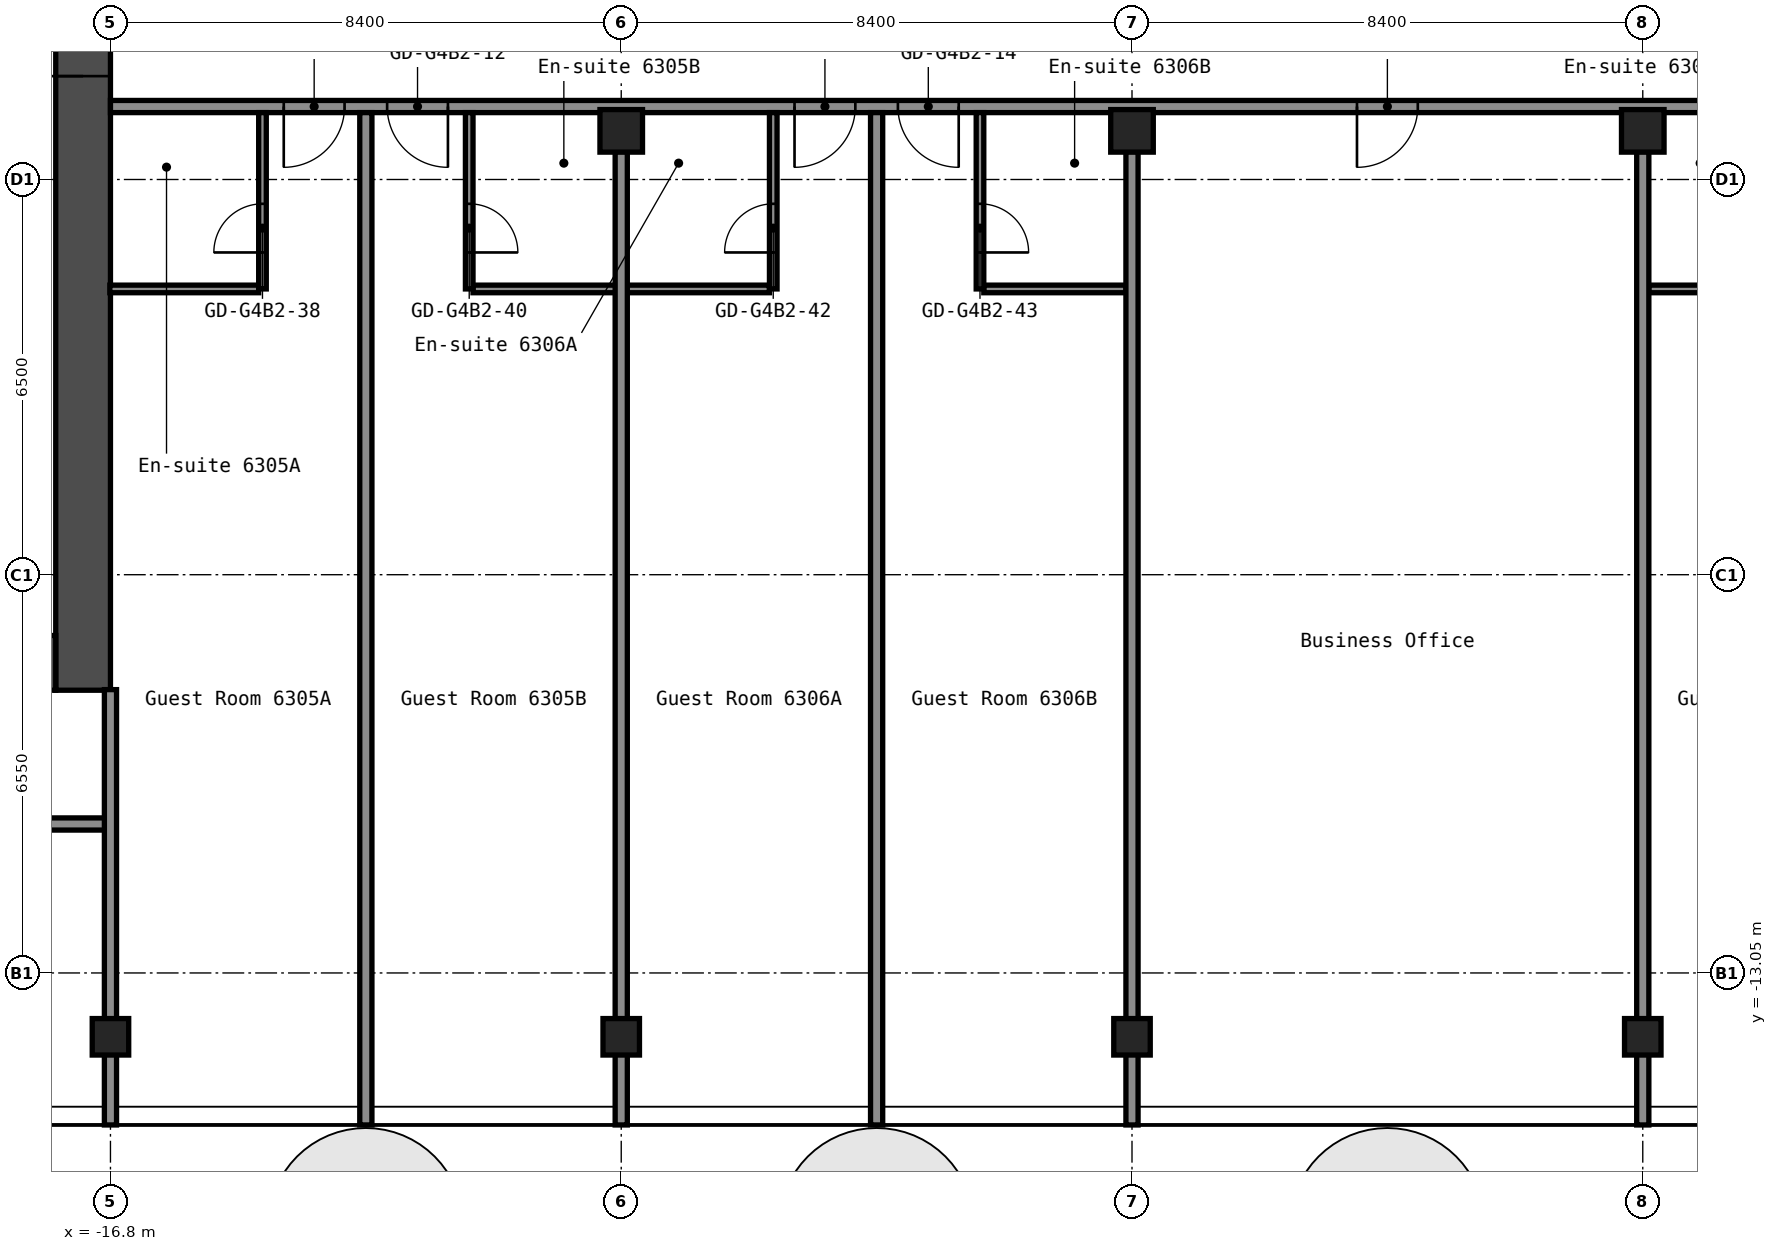
"""IFC4 building model, lengths in metres.
Left out: names, types, materials, properties, quantities, classifications, styles, units other than length and angle.
Written with IfcOpenShell. Run it as: python <this file> out.ifc"""

import sys

from ifc_helpers import new_model, si_unit, direction, frame, frame_2d, origin, origin_2d, place, context, subcontext, project, spatial, rectangle, hollow_rectangle, extrude, element, fill, save


model = new_model("IFC4")
c1 = context("Model", 3, precision=1e-05, world=origin(), true_north=direction((0.0, 1.0)))
c2 = subcontext(c1, "Body", "Model", "MODEL_VIEW")
j1 = project(units=[si_unit("LENGTHUNIT", "METRE"), si_unit("PLANEANGLEUNIT", "RADIAN")], contexts=[c1])
p1 = place(None, origin())
s1 = spatial("IfcSite", under=j1, at=p1, CompositionType="ELEMENT")
p2 = place(p1, origin())
s2 = spatial("IfcBuilding", under=s1, at=p2, CompositionType="ELEMENT")
p3 = place(p2, frame((0.0, 0.0, 221.8)))
s3 = spatial("IfcBuildingStorey", under=s2, at=p3, CompositionType="ELEMENT", Elevation=221.8)
for number, where, z_axis, x_axis in (
    (1, (-16.8, -14.1, 0.0), (0.0, 0.0, 1.0), (1.0, 0.0, 0.0)),
    (2, (-8.4, -14.1, 0.0), (0.0, 0.0, 1.0), (1.0, 0.0, 0.0)),
):
    element("IfcColumn", number, at=place(p3, frame(where, z_axis=z_axis, x_axis=x_axis)), inside=s3, PredefinedType="COLUMN", context=c2, shape_type="SweptSolid", body=[
        extrude(hollow_rectangle(XDim=0.6, YDim=0.6, WallThickness=0.025, InnerFilletRadius=0.038, OuterFilletRadius=0.062, at=origin_2d()), origin(), (0.0, 0.0, 1.0), 2.75),
    ])
p4 = place(p3, frame((-8.4, 0.8, 0.0), z_axis=(0.0, 0.0, 1.0), x_axis=(1.0, 0.0, 0.0)))
e3 = element("IfcColumn", 3, at=p4, inside=s3, PredefinedType="COLUMN", context=c2, shape_type="SweptSolid", body=[
    extrude(hollow_rectangle(XDim=0.7, YDim=0.7, WallThickness=0.028, at=origin_2d()), origin(), (0.0, 0.0, 1.0), 2.75),
])
p5 = place(p3, frame((0.0, -14.1, 0.0), z_axis=(0.0, 0.0, 1.0), x_axis=(1.0, 0.0, 0.0)))
e4 = element("IfcColumn", 4, at=p5, inside=s3, PredefinedType="COLUMN", context=c2, shape_type="SweptSolid", body=[
    extrude(hollow_rectangle(XDim=0.6, YDim=0.6, WallThickness=0.025, InnerFilletRadius=0.038, OuterFilletRadius=0.062, at=origin_2d()), origin(), (0.0, 0.0, 1.0), 2.75),
])
p6 = place(p3, frame((0.0, 0.8, 0.0), z_axis=(0.0, 0.0, 1.0), x_axis=(1.0, 0.0, 0.0)))
e5 = element("IfcColumn", 5, at=p6, inside=s3, PredefinedType="COLUMN", context=c2, shape_type="SweptSolid", body=[
    extrude(hollow_rectangle(XDim=0.7, YDim=0.7, WallThickness=0.028, at=origin_2d()), origin(), (0.0, 0.0, 1.0), 2.75),
])
p7 = place(p3, frame((8.4, -14.1, 0.0), z_axis=(0.0, 0.0, 1.0), x_axis=(1.0, 0.0, 0.0)))
e6 = element("IfcColumn", 6, at=p7, inside=s3, PredefinedType="COLUMN", context=c2, shape_type="SweptSolid", body=[
    extrude(hollow_rectangle(XDim=0.6, YDim=0.6, WallThickness=0.025, InnerFilletRadius=0.038, OuterFilletRadius=0.062, at=origin_2d()), origin(), (0.0, 0.0, 1.0), 2.75),
])
p8 = place(p3, frame((8.4, 0.8, 0.0), z_axis=(0.0, 0.0, 1.0), x_axis=(1.0, 0.0, 0.0)))
e7 = element("IfcColumn", 7, at=p8, inside=s3, PredefinedType="COLUMN", context=c2, shape_type="SweptSolid", body=[
    extrude(hollow_rectangle(XDim=0.7, YDim=0.7, WallThickness=0.028, at=origin_2d()), origin(), (0.0, 0.0, 1.0), 2.75),
])
p9 = place(p3, frame((-17.25, -8.4, 0.0), z_axis=(0.0, 0.0, 1.0), x_axis=(0.0, 1.0, 0.0)))
e8 = element("IfcWall", 8, at=p9, inside=s3, PredefinedType="SHEAR", context=c2, shape_type="SweptSolid", body=[
    extrude(rectangle(XDim=16.8, YDim=0.9, at=frame_2d((8.4, 0.0))), origin(), (0.0, 0.0, 1.0), 2.75),
])
p10 = place(p9, frame((10.1, 0.0, 0.0)))
e9 = element("IfcOpeningElement", 9, at=p10, cuts=e8, PredefinedType="OPENING", context=c2, shape_type="SweptSolid", body=[
    extrude(rectangle(XDim=1.6, YDim=2.1, at=frame_2d((0.8, 1.05))), frame((0.0, 0.46, 0.0), z_axis=(0.0, -1.0, 0.0), x_axis=(1.0, 0.0, 0.0)), (0.0, 0.0, 1.0), 0.92),
])
p11 = place(p3, frame((-32.7, -7.95, 0.0), z_axis=(0.0, 0.0, 1.0), x_axis=(1.0, 0.0, 0.0)))
e10 = element("IfcWall", 10, at=p11, inside=s3, PredefinedType="SHEAR", context=c2, shape_type="SweptSolid", body=[
    extrude(rectangle(XDim=15.0, YDim=0.9, at=frame_2d((7.5, 0.0))), origin(), (0.0, 0.0, 1.0), 2.75),
])
p12 = place(p11, frame((11.45, 0.0, 0.0)))
e11 = element("IfcOpeningElement", 11, at=p12, cuts=e10, PredefinedType="OPENING", context=c2, shape_type="SweptSolid", body=[
    extrude(rectangle(XDim=1.0, YDim=2.1, at=frame_2d((0.5, 1.05))), frame((0.0, 0.46, 0.0), z_axis=(0.0, -1.0, 0.0), x_axis=(1.0, 0.0, 0.0)), (0.0, 0.0, 1.0), 0.92),
])
p13 = place(p3, frame((-38.1, -10.6, 0.0), z_axis=(0.0, 0.0, 1.0), x_axis=(1.0, 0.0, 0.0)))
e12 = element("IfcWall", 12, at=p13, inside=s3, PredefinedType="PARTITIONING", context=c2, shape_type="SweptSolid", body=[
    extrude(rectangle(XDim=21.3, YDim=0.2, at=frame_2d((10.65, 0.0))), origin(), (0.0, 0.0, 1.0), 2.75),
])
p14 = place(p13, frame((1.95, 0.0, 0.0)))
e13 = element("IfcOpeningElement", 13, at=p14, cuts=e12, PredefinedType="OPENING", context=c2, shape_type="SweptSolid", body=[
    extrude(rectangle(XDim=0.9, YDim=2.1, at=frame_2d((0.45, 1.05))), frame((0.0, 0.11, 0.0), z_axis=(0.0, -1.0, 0.0), x_axis=(1.0, 0.0, 0.0)), (0.0, 0.0, 1.0), 0.22),
])
p15 = place(p13, frame((6.32, 0.0, 0.0)))
e14 = element("IfcOpeningElement", 14, at=p15, cuts=e12, PredefinedType="OPENING", context=c2, shape_type="SweptSolid", body=[
    extrude(rectangle(XDim=0.9, YDim=2.1, at=frame_2d((0.45, 1.05))), frame((0.0, 0.11, 0.0), z_axis=(0.0, -1.0, 0.0), x_axis=(1.0, 0.0, 0.0)), (0.0, 0.0, 1.0), 0.22),
])
p16 = place(p13, frame((10.52, 0.0, 0.0)))
e15 = element("IfcOpeningElement", 15, at=p16, cuts=e12, PredefinedType="OPENING", context=c2, shape_type="SweptSolid", body=[
    extrude(rectangle(XDim=0.9, YDim=2.1, at=frame_2d((0.45, 1.05))), frame((0.0, 0.11, 0.0), z_axis=(0.0, -1.0, 0.0), x_axis=(1.0, 0.0, 0.0)), (0.0, 0.0, 1.0), 0.22),
])
p17 = place(p13, frame((14.045, 0.0, 0.0)))
e16 = element("IfcOpeningElement", 16, at=p17, cuts=e12, PredefinedType="OPENING", context=c2, shape_type="SweptSolid", body=[
    extrude(rectangle(XDim=0.9, YDim=2.1, at=frame_2d((0.45, 1.05))), frame((0.0, 0.11, 0.0), z_axis=(0.0, -1.0, 0.0), x_axis=(1.0, 0.0, 0.0)), (0.0, 0.0, 1.0), 0.22),
])
p18 = place(p13, frame((18.245, 0.0, 0.0)))
e17 = element("IfcOpeningElement", 17, at=p18, cuts=e12, PredefinedType="OPENING", context=c2, shape_type="SweptSolid", body=[
    extrude(rectangle(XDim=0.9, YDim=2.1, at=frame_2d((0.45, 1.05))), frame((0.0, 0.11, 0.0), z_axis=(0.0, -1.0, 0.0), x_axis=(1.0, 0.0, 0.0)), (0.0, 0.0, 1.0), 0.22),
])
p19 = place(p3, frame((-16.81, -1.8, 0.0), z_axis=(0.0, 0.0, 1.0), x_axis=(1.0, 0.0, 0.0)))
e18 = element("IfcWall", 18, at=p19, inside=s3, PredefinedType="PARTITIONING", context=c2, shape_type="SweptSolid", body=[
    extrude(rectangle(XDim=2.448, YDim=0.125, at=frame_2d((1.224, 0.0))), origin(), (0.0, 0.0, 1.0), 2.75),
])
p20 = place(p3, frame((-10.837, -1.8, 0.0), z_axis=(0.0, 0.0, 1.0), x_axis=(1.0, 0.0, 0.0)))
e19 = element("IfcWall", 19, at=p20, inside=s3, PredefinedType="PARTITIONING", context=c2, shape_type="SweptSolid", body=[
    extrude(rectangle(XDim=4.875, YDim=0.125, at=frame_2d((2.438, 0.0))), origin(), (0.0, 0.0, 1.0), 2.75),
])
for number, where, z_axis, x_axis in (
    (20, (-2.438, -1.8, 0.0), (0.0, 0.0, 1.0), (1.0, 0.0, 0.0)),
    (21, (8.5, -1.8, 0.0), (0.0, 0.0, 1.0), (1.0, 0.0, 0.0)),
):
    element("IfcWall", number, at=place(p3, frame(where, z_axis=z_axis, x_axis=x_axis)), inside=s3, PredefinedType="PARTITIONING", context=c2, shape_type="SweptSolid", body=[
        extrude(rectangle(XDim=2.337, YDim=0.125, at=frame_2d((1.169, 0.0))), origin(), (0.0, 0.0, 1.0), 2.75),
    ])
p21 = place(p3, frame((-16.8, 1.2, 0.0), z_axis=(0.0, 0.0, 1.0), x_axis=(1.0, 0.0, 0.0)))
e22 = element("IfcWall", 22, at=p21, inside=s3, PredefinedType="PARTITIONING", context=c2, shape_type="SweptSolid", body=[
    extrude(rectangle(XDim=33.6, YDim=0.2, at=frame_2d((16.8, 0.0))), origin(), (0.0, 0.0, 1.0), 2.75),
])
p22 = place(p21, frame((2.85, 0.0, 0.0)))
e23 = element("IfcOpeningElement", 23, at=p22, cuts=e22, PredefinedType="OPENING", context=c2, shape_type="SweptSolid", body=[
    extrude(rectangle(XDim=1.0, YDim=2.1, at=frame_2d((0.5, 1.05))), frame((0.0, 0.11, 0.0), z_axis=(0.0, -1.0, 0.0), x_axis=(1.0, 0.0, 0.0)), (0.0, 0.0, 1.0), 0.22),
])
p23 = place(p21, frame((4.55, 0.0, 0.0)))
e24 = element("IfcOpeningElement", 24, at=p23, cuts=e22, PredefinedType="OPENING", context=c2, shape_type="SweptSolid", body=[
    extrude(rectangle(XDim=1.0, YDim=2.1, at=frame_2d((0.5, 1.05))), frame((0.0, 0.11, 0.0), z_axis=(0.0, -1.0, 0.0), x_axis=(1.0, 0.0, 0.0)), (0.0, 0.0, 1.0), 0.22),
])
p24 = place(p21, frame((11.25, 0.0, 0.0)))
e25 = element("IfcOpeningElement", 25, at=p24, cuts=e22, PredefinedType="OPENING", context=c2, shape_type="SweptSolid", body=[
    extrude(rectangle(XDim=1.0, YDim=2.1, at=frame_2d((0.5, 1.05))), frame((0.0, 0.11, 0.0), z_axis=(0.0, -1.0, 0.0), x_axis=(1.0, 0.0, 0.0)), (0.0, 0.0, 1.0), 0.22),
])
p25 = place(p21, frame((12.95, 0.0, 0.0)))
e26 = element("IfcOpeningElement", 26, at=p25, cuts=e22, PredefinedType="OPENING", context=c2, shape_type="SweptSolid", body=[
    extrude(rectangle(XDim=1.0, YDim=2.1, at=frame_2d((0.5, 1.05))), frame((0.0, 0.11, 0.0), z_axis=(0.0, -1.0, 0.0), x_axis=(1.0, 0.0, 0.0)), (0.0, 0.0, 1.0), 0.22),
])
p26 = place(p21, frame((20.5, 0.0, 0.0)))
e27 = element("IfcOpeningElement", 27, at=p26, cuts=e22, PredefinedType="OPENING", context=c2, shape_type="SweptSolid", body=[
    extrude(rectangle(XDim=1.0, YDim=2.1, at=frame_2d((0.5, 1.05))), frame((0.0, 0.11, 0.0), z_axis=(0.0, -1.0, 0.0), x_axis=(1.0, 0.0, 0.0)), (0.0, 0.0, 1.0), 0.22),
])
p27 = place(p21, frame((28.05, 0.0, 0.0)))
e28 = element("IfcOpeningElement", 28, at=p27, cuts=e22, PredefinedType="OPENING", context=c2, shape_type="SweptSolid", body=[
    extrude(rectangle(XDim=1.0, YDim=2.1, at=frame_2d((0.5, 1.05))), frame((0.0, 0.11, 0.0), z_axis=(0.0, -1.0, 0.0), x_axis=(1.0, 0.0, 0.0)), (0.0, 0.0, 1.0), 0.22),
])
p28 = place(p21, frame((29.75, 0.0, 0.0)))
e29 = element("IfcOpeningElement", 29, at=p28, cuts=e22, PredefinedType="OPENING", context=c2, shape_type="SweptSolid", body=[
    extrude(rectangle(XDim=1.0, YDim=2.1, at=frame_2d((0.5, 1.05))), frame((0.0, 0.11, 0.0), z_axis=(0.0, -1.0, 0.0), x_axis=(1.0, 0.0, 0.0)), (0.0, 0.0, 1.0), 0.22),
])
p29 = place(p3, frame((-16.8, -15.55, 0.0), z_axis=(0.0, 0.0, 1.0), x_axis=(0.0, 1.0, 0.0)))
e30 = element("IfcWall", 30, at=p29, inside=s3, PredefinedType="PARTITIONING", context=c2, shape_type="SweptSolid", body=[
    extrude(rectangle(XDim=7.16, YDim=0.2, at=frame_2d((3.58, 0.0))), origin(), (0.0, 0.0, 1.0), 2.75),
])
p30 = place(p3, frame((-14.3, -1.8, 0.0), z_axis=(0.0, 0.0, 1.0), x_axis=(0.0, 1.0, 0.0)))
e31 = element("IfcWall", 31, at=p30, inside=s3, PredefinedType="PARTITIONING", context=c2, shape_type="SweptSolid", body=[
    extrude(rectangle(XDim=2.9, YDim=0.125, at=frame_2d((1.45, 0.0))), origin(), (0.0, 0.0, 1.0), 2.75),
])
p31 = place(p30, frame((0.6, 0.0, 0.0)))
e32 = element("IfcOpeningElement", 32, at=p31, cuts=e31, PredefinedType="OPENING", context=c2, shape_type="SweptSolid", body=[
    extrude(rectangle(XDim=0.8, YDim=2.1, at=frame_2d((0.4, 1.05))), frame((0.0, 0.073, 0.0), z_axis=(0.0, -1.0, 0.0), x_axis=(1.0, 0.0, 0.0)), (0.0, 0.0, 1.0), 0.145),
])
p32 = place(p3, frame((-12.6, -15.55, 0.0), z_axis=(0.0, 0.0, 1.0), x_axis=(0.0, 1.0, 0.0)))
e33 = element("IfcWall", 33, at=p32, inside=s3, PredefinedType="PARTITIONING", context=c2, shape_type="SweptSolid", body=[
    extrude(rectangle(XDim=16.65, YDim=0.2, at=frame_2d((8.325, 0.0))), origin(), (0.0, 0.0, 1.0), 2.75),
])
p33 = place(p3, frame((-10.9, -1.8, 0.0), z_axis=(0.0, 0.0, 1.0), x_axis=(0.0, 1.0, 0.0)))
e34 = element("IfcWall", 34, at=p33, inside=s3, PredefinedType="PARTITIONING", context=c2, shape_type="SweptSolid", body=[
    extrude(rectangle(XDim=2.9, YDim=0.125, at=frame_2d((1.45, 0.0))), origin(), (0.0, 0.0, 1.0), 2.75),
])
p34 = place(p33, frame((0.6, 0.0, 0.0)))
e35 = element("IfcOpeningElement", 35, at=p34, cuts=e34, PredefinedType="OPENING", context=c2, shape_type="SweptSolid", body=[
    extrude(rectangle(XDim=0.8, YDim=2.1, at=frame_2d((0.4, 1.05))), frame((0.0, 0.073, 0.0), z_axis=(0.0, -1.0, 0.0), x_axis=(1.0, 0.0, 0.0)), (0.0, 0.0, 1.0), 0.145),
])
p35 = place(p3, frame((-8.4, -15.55, 0.0), z_axis=(0.0, 0.0, 1.0), x_axis=(0.0, 1.0, 0.0)))
e36 = element("IfcWall", 36, at=p35, inside=s3, PredefinedType="PARTITIONING", context=c2, shape_type="SweptSolid", body=[
    extrude(rectangle(XDim=16.01, YDim=0.2, at=frame_2d((8.005, 0.0))), origin(), (0.0, 0.0, 1.0), 2.75),
])
p36 = place(p3, frame((-5.9, -1.8, 0.0), z_axis=(0.0, 0.0, 1.0), x_axis=(0.0, 1.0, 0.0)))
e37 = element("IfcWall", 37, at=p36, inside=s3, PredefinedType="PARTITIONING", context=c2, shape_type="SweptSolid", body=[
    extrude(rectangle(XDim=2.9, YDim=0.125, at=frame_2d((1.45, 0.0))), origin(), (0.0, 0.0, 1.0), 2.75),
])
p37 = place(p36, frame((0.6, 0.0, 0.0)))
e38 = element("IfcOpeningElement", 38, at=p37, cuts=e37, PredefinedType="OPENING", context=c2, shape_type="SweptSolid", body=[
    extrude(rectangle(XDim=0.8, YDim=2.1, at=frame_2d((0.4, 1.05))), frame((0.0, 0.073, 0.0), z_axis=(0.0, -1.0, 0.0), x_axis=(1.0, 0.0, 0.0)), (0.0, 0.0, 1.0), 0.145),
])
p38 = place(p3, frame((-4.2, -15.55, 0.0), z_axis=(0.0, 0.0, 1.0), x_axis=(0.0, 1.0, 0.0)))
e39 = element("IfcWall", 39, at=p38, inside=s3, PredefinedType="PARTITIONING", context=c2, shape_type="SweptSolid", body=[
    extrude(rectangle(XDim=16.65, YDim=0.2, at=frame_2d((8.325, 0.0))), origin(), (0.0, 0.0, 1.0), 2.75),
])
p39 = place(p3, frame((-2.5, -1.8, 0.0), z_axis=(0.0, 0.0, 1.0), x_axis=(0.0, 1.0, 0.0)))
e40 = element("IfcWall", 40, at=p39, inside=s3, PredefinedType="PARTITIONING", context=c2, shape_type="SweptSolid", body=[
    extrude(rectangle(XDim=2.9, YDim=0.125, at=frame_2d((1.45, 0.0))), origin(), (0.0, 0.0, 1.0), 2.75),
])
p40 = place(p39, frame((0.6, 0.0, 0.0)))
e41 = element("IfcOpeningElement", 41, at=p40, cuts=e40, PredefinedType="OPENING", context=c2, shape_type="SweptSolid", body=[
    extrude(rectangle(XDim=0.8, YDim=2.1, at=frame_2d((0.4, 1.05))), frame((0.0, 0.073, 0.0), z_axis=(0.0, -1.0, 0.0), x_axis=(1.0, 0.0, 0.0)), (0.0, 0.0, 1.0), 0.145),
])
for number, where, z_axis, x_axis in (
    (42, (0.0, -15.55, 0.0), (0.0, 0.0, 1.0), (0.0, 1.0, 0.0)),
    (43, (8.4, -15.55, 0.0), (0.0, 0.0, 1.0), (0.0, 1.0, 0.0)),
):
    element("IfcWall", number, at=place(p3, frame(where, z_axis=z_axis, x_axis=x_axis)), inside=s3, PredefinedType="PARTITIONING", context=c2, shape_type="SweptSolid", body=[
        extrude(rectangle(XDim=16.01, YDim=0.2, at=frame_2d((8.005, 0.0))), origin(), (0.0, 0.0, 1.0), 2.75),
    ])
p41 = place(p10, origin())
e44 = element("IfcDoor", 44, at=p41, inside=s3, OperationType="DOUBLE_DOOR_SINGLE_SWING", PredefinedType="DOOR", context=c2, shape_type="SweptSolid", body=[
    extrude(rectangle(XDim=1.6, YDim=2.1, at=frame_2d((0.8, 1.05))), frame((0.0, 0.025, 0.0), z_axis=(0.0, -1.0, 0.0), x_axis=(1.0, 0.0, 0.0)), (0.0, 0.0, 1.0), 0.05),
])
fill(e9, e44)
p42 = place(p22, origin())
e45 = element("IfcDoor", 45, at=p42, inside=s3, OperationType="SINGLE_SWING_LEFT", PredefinedType="DOOR", context=c2, shape_type="SweptSolid", body=[
    extrude(rectangle(XDim=1.0, YDim=2.1, at=frame_2d((0.5, 1.05))), frame((0.0, 0.025, 0.0), z_axis=(0.0, -1.0, 0.0), x_axis=(1.0, 0.0, 0.0)), (0.0, 0.0, 1.0), 0.05),
])
fill(e23, e45)
p43 = place(p23, origin())
e46 = element("IfcDoor", 46, at=p43, inside=s3, OperationType="SINGLE_SWING_RIGHT", PredefinedType="DOOR", context=c2, shape_type="SweptSolid", body=[
    extrude(rectangle(XDim=1.0, YDim=2.1, at=frame_2d((0.5, 1.05))), frame((0.0, 0.025, 0.0), z_axis=(0.0, -1.0, 0.0), x_axis=(1.0, 0.0, 0.0)), (0.0, 0.0, 1.0), 0.05),
])
fill(e24, e46)
p44 = place(p24, origin())
e47 = element("IfcDoor", 47, at=p44, inside=s3, OperationType="SINGLE_SWING_LEFT", PredefinedType="DOOR", context=c2, shape_type="SweptSolid", body=[
    extrude(rectangle(XDim=1.0, YDim=2.1, at=frame_2d((0.5, 1.05))), frame((0.0, 0.025, 0.0), z_axis=(0.0, -1.0, 0.0), x_axis=(1.0, 0.0, 0.0)), (0.0, 0.0, 1.0), 0.05),
])
fill(e25, e47)
p45 = place(p25, origin())
e48 = element("IfcDoor", 48, at=p45, inside=s3, OperationType="SINGLE_SWING_RIGHT", PredefinedType="DOOR", context=c2, shape_type="SweptSolid", body=[
    extrude(rectangle(XDim=1.0, YDim=2.1, at=frame_2d((0.5, 1.05))), frame((0.0, 0.025, 0.0), z_axis=(0.0, -1.0, 0.0), x_axis=(1.0, 0.0, 0.0)), (0.0, 0.0, 1.0), 0.05),
])
fill(e26, e48)
p46 = place(p26, origin())
e49 = element("IfcDoor", 49, at=p46, inside=s3, OperationType="SINGLE_SWING_LEFT", PredefinedType="DOOR", context=c2, shape_type="SweptSolid", body=[
    extrude(rectangle(XDim=1.0, YDim=2.1, at=frame_2d((0.5, 1.05))), frame((0.0, 0.025, 0.0), z_axis=(0.0, -1.0, 0.0), x_axis=(1.0, 0.0, 0.0)), (0.0, 0.0, 1.0), 0.05),
])
fill(e27, e49)
p47 = place(p31, origin())
e50 = element("IfcDoor", 50, at=p47, inside=s3, OperationType="SINGLE_SWING_RIGHT", PredefinedType="DOOR", context=c2, shape_type="SweptSolid", body=[
    extrude(rectangle(XDim=0.8, YDim=2.1, at=frame_2d((0.4, 1.05))), frame((0.0, 0.025, 0.0), z_axis=(0.0, -1.0, 0.0), x_axis=(1.0, 0.0, 0.0)), (0.0, 0.0, 1.0), 0.05),
])
fill(e32, e50)
p48 = place(p34, origin())
e51 = element("IfcDoor", 51, at=p48, inside=s3, OperationType="SINGLE_SWING_LEFT", PredefinedType="DOOR", context=c2, shape_type="SweptSolid", body=[
    extrude(rectangle(XDim=0.8, YDim=2.1, at=frame_2d((0.4, 1.05))), frame((0.0, 0.025, 0.0), z_axis=(0.0, -1.0, 0.0), x_axis=(1.0, 0.0, 0.0)), (0.0, 0.0, 1.0), 0.05),
])
fill(e35, e51)
p49 = place(p37, origin())
e52 = element("IfcDoor", 52, at=p49, inside=s3, OperationType="SINGLE_SWING_RIGHT", PredefinedType="DOOR", context=c2, shape_type="SweptSolid", body=[
    extrude(rectangle(XDim=0.8, YDim=2.1, at=frame_2d((0.4, 1.05))), frame((0.0, 0.025, 0.0), z_axis=(0.0, -1.0, 0.0), x_axis=(1.0, 0.0, 0.0)), (0.0, 0.0, 1.0), 0.05),
])
fill(e38, e52)
p50 = place(p40, origin())
e53 = element("IfcDoor", 53, at=p50, inside=s3, OperationType="SINGLE_SWING_LEFT", PredefinedType="DOOR", context=c2, shape_type="SweptSolid", body=[
    extrude(rectangle(XDim=0.8, YDim=2.1, at=frame_2d((0.4, 1.05))), frame((0.0, 0.025, 0.0), z_axis=(0.0, -1.0, 0.0), x_axis=(1.0, 0.0, 0.0)), (0.0, 0.0, 1.0), 0.05),
])
fill(e41, e53)
save(model, sys.argv[1])
